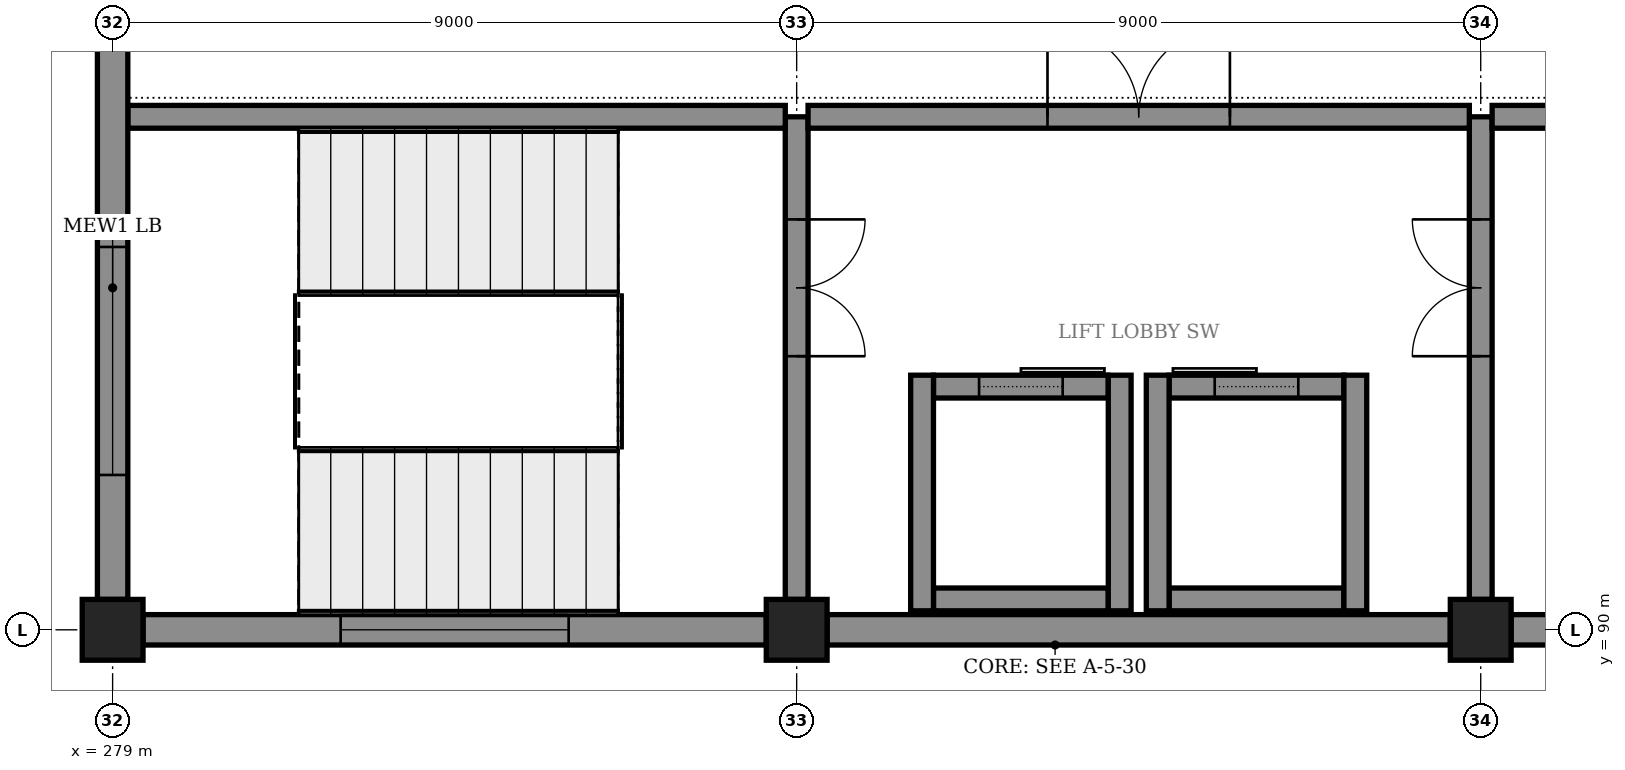
"""IFC4 building model, lengths in metres.
Left out: names, types, materials, properties, quantities, classifications, styles, units other than length and angle.
Written with IfcOpenShell. Run it as: python <this file> out.ifc"""

import sys

from ifc_helpers import new_model, si_unit, direction, frame, frame_2d, origin, origin_2d, place, context, subcontext, project, spatial, rectangle, extrude, element, fill, save


model = new_model("IFC4")
c1 = context("Model", 3, precision=1e-05, world=origin(), true_north=direction((0.0, 1.0)))
c2 = subcontext(c1, "Body", "Model", "MODEL_VIEW")
j1 = project(units=[si_unit("LENGTHUNIT", "METRE"), si_unit("PLANEANGLEUNIT", "RADIAN")], contexts=[c1])
p1 = place(None, origin())
s1 = spatial("IfcSite", under=j1, at=p1, CompositionType="ELEMENT")
p2 = place(p1, origin())
s2 = spatial("IfcBuilding", under=s1, at=p2, CompositionType="ELEMENT")
p3 = place(p2, frame((0.0, 0.0, 6.0)))
s3 = spatial("IfcBuildingStorey", under=s2, at=p3, CompositionType="ELEMENT", Elevation=6.0)
for number, where, z_axis, x_axis in (
    (1, (279.0, 90.0, 0.0), (0.0, 0.0, 1.0), (1.0, 0.0, 0.0)),
    (2, (288.0, 90.0, 0.0), (0.0, 0.0, 1.0), (1.0, 0.0, 0.0)),
    (3, (297.0, 90.0, 0.0), (0.0, 0.0, 1.0), (1.0, 0.0, 0.0)),
):
    element("IfcColumn", number, at=place(p3, frame(where, z_axis=z_axis, x_axis=x_axis)), inside=s3, PredefinedType="COLUMN", context=c2, shape_type="SweptSolid", body=[
        extrude(rectangle(XDim=0.8, YDim=0.8, at=origin_2d()), origin(), (0.0, 0.0, 1.0), 5.5),
    ])
p4 = place(p3, frame((279.4, 90.0, 0.0), z_axis=(0.0, 0.0, 1.0), x_axis=(1.0, 0.0, 0.0)))
e4 = element("IfcWall", 4, at=p4, inside=s3, PredefinedType="STANDARD", context=c2, shape_type="SweptSolid", body=[
    extrude(rectangle(XDim=8.2, YDim=0.4, at=frame_2d((4.1, 0.0))), origin(), (0.0, 0.0, 1.0), 4.32),
])
p5 = place(p4, frame((2.6, 0.0, 0.9)))
e5 = element("IfcOpeningElement", 5, at=p5, cuts=e4, PredefinedType="OPENING", context=c2, shape_type="SweptSolid", body=[
    extrude(rectangle(XDim=3.0, YDim=2.1, at=frame_2d((1.5, 1.05))), frame((0.0, 0.21, 0.0), z_axis=(0.0, -1.0, 0.0), x_axis=(1.0, 0.0, 0.0)), (0.0, 0.0, 1.0), 0.42),
])
p6 = place(p3, frame((288.4, 90.0, 0.0), z_axis=(0.0, 0.0, 1.0), x_axis=(1.0, 0.0, 0.0)))
e6 = element("IfcWall", 6, at=p6, inside=s3, PredefinedType="STANDARD", context=c2, shape_type="SweptSolid", body=[
    extrude(rectangle(XDim=8.2, YDim=0.4, at=frame_2d((4.1, 0.0))), origin(), (0.0, 0.0, 1.0), 4.32),
])
p7 = place(p3, frame((297.4, 90.0, 0.0), z_axis=(0.0, 0.0, 1.0), x_axis=(1.0, 0.0, 0.0)))
e7 = element("IfcWall", 7, at=p7, inside=s3, PredefinedType="STANDARD", context=c2, shape_type="SweptSolid", body=[
    extrude(rectangle(XDim=8.2, YDim=0.4, at=frame_2d((4.1, 0.0))), origin(), (0.0, 0.0, 1.0), 4.32),
])
p8 = place(p7, frame((2.6, 0.0, 0.9)))
e8 = element("IfcOpeningElement", 8, at=p8, cuts=e7, PredefinedType="OPENING", context=c2, shape_type="SweptSolid", body=[
    extrude(rectangle(XDim=3.0, YDim=2.1, at=frame_2d((1.5, 1.05))), frame((0.0, 0.21, 0.0), z_axis=(0.0, -1.0, 0.0), x_axis=(1.0, 0.0, 0.0)), (0.0, 0.0, 1.0), 0.42),
])
p9 = place(p3, frame((279.0, 90.4, 0.0), z_axis=(0.0, 0.0, 1.0), x_axis=(0.0, 1.0, 0.0)))
e9 = element("IfcWall", 9, at=p9, inside=s3, PredefinedType="STANDARD", context=c2, shape_type="SweptSolid", body=[
    extrude(rectangle(XDim=8.2, YDim=0.4, at=frame_2d((4.1, 0.0))), origin(), (0.0, 0.0, 1.0), 4.32),
])
p10 = place(p9, frame((1.638, 0.0, 0.9)))
e10 = element("IfcOpeningElement", 10, at=p10, cuts=e9, PredefinedType="OPENING", context=c2, shape_type="SweptSolid", body=[
    extrude(rectangle(XDim=3.0, YDim=2.1, at=frame_2d((1.5, 1.05))), frame((0.0, 0.21, 0.0), z_axis=(0.0, -1.0, 0.0), x_axis=(1.0, 0.0, 0.0)), (0.0, 0.0, 1.0), 0.42),
])
p11 = place(p3, frame((288.0, 90.4, 0.0), z_axis=(0.0, 0.0, 1.0), x_axis=(0.0, 1.0, 0.0)))
e11 = element("IfcWall", 11, at=p11, inside=s3, PredefinedType="SHEAR", context=c2, shape_type="SweptSolid", body=[
    extrude(rectangle(XDim=6.35, YDim=0.3, at=frame_2d((3.175, 0.0))), origin(), (0.0, 0.0, 1.0), 5.22),
])
p12 = place(p11, frame((3.2, 0.0, 0.0)))
e12 = element("IfcOpeningElement", 12, at=p12, cuts=e11, PredefinedType="OPENING", context=c2, shape_type="SweptSolid", body=[
    extrude(rectangle(XDim=1.8, YDim=2.4, at=frame_2d((0.9, 1.2))), frame((0.0, 0.16, 0.0), z_axis=(0.0, -1.0, 0.0), x_axis=(1.0, 0.0, 0.0)), (0.0, 0.0, 1.0), 0.32),
])
p13 = place(p3, frame((297.0, 90.4, 0.0), z_axis=(0.0, 0.0, 1.0), x_axis=(0.0, 1.0, 0.0)))
e13 = element("IfcWall", 13, at=p13, inside=s3, PredefinedType="SHEAR", context=c2, shape_type="SweptSolid", body=[
    extrude(rectangle(XDim=6.35, YDim=0.3, at=frame_2d((3.175, 0.0))), origin(), (0.0, 0.0, 1.0), 5.22),
])
p14 = place(p13, frame((3.2, 0.0, 0.0)))
e14 = element("IfcOpeningElement", 14, at=p14, cuts=e13, PredefinedType="OPENING", context=c2, shape_type="SweptSolid", body=[
    extrude(rectangle(XDim=1.8, YDim=2.4, at=frame_2d((0.9, 1.2))), frame((0.0, 0.16, 0.0), z_axis=(0.0, -1.0, 0.0), x_axis=(1.0, 0.0, 0.0)), (0.0, 0.0, 1.0), 0.32),
])
p15 = place(p3, frame((279.2, 96.75, 0.0), z_axis=(0.0, 0.0, 1.0), x_axis=(1.0, 0.0, 0.0)))
e15 = element("IfcWall", 15, at=p15, inside=s3, PredefinedType="SHEAR", context=c2, shape_type="SweptSolid", body=[
    extrude(rectangle(XDim=8.65, YDim=0.3, at=frame_2d((4.325, 0.0))), origin(), (0.0, 0.0, 1.0), 5.22),
])
p16 = place(p3, frame((288.15, 96.75, 0.0), z_axis=(0.0, 0.0, 1.0), x_axis=(1.0, 0.0, 0.0)))
e16 = element("IfcWall", 16, at=p16, inside=s3, PredefinedType="SHEAR", context=c2, shape_type="SweptSolid", body=[
    extrude(rectangle(XDim=8.7, YDim=0.3, at=frame_2d((4.35, 0.0))), origin(), (0.0, 0.0, 1.0), 5.22),
])
p17 = place(p16, frame((3.15, 0.0, 0.0)))
e17 = element("IfcOpeningElement", 17, at=p17, cuts=e16, PredefinedType="OPENING", context=c2, shape_type="SweptSolid", body=[
    extrude(rectangle(XDim=2.4, YDim=2.4, at=frame_2d((1.2, 1.2))), frame((0.0, 0.16, 0.0), z_axis=(0.0, -1.0, 0.0), x_axis=(1.0, 0.0, 0.0)), (0.0, 0.0, 1.0), 0.32),
])
p18 = place(p3, frame((297.15, 96.75, 0.0), z_axis=(0.0, 0.0, 1.0), x_axis=(1.0, 0.0, 0.0)))
e18 = element("IfcWall", 18, at=p18, inside=s3, PredefinedType="SHEAR", context=c2, shape_type="SweptSolid", body=[
    extrude(rectangle(XDim=8.7, YDim=0.3, at=frame_2d((4.35, 0.0))), origin(), (0.0, 0.0, 1.0), 5.22),
])
for number, where, z_axis, x_axis in (
    (19, (289.65, 90.25, 0.0), (0.0, 0.0, 1.0), (0.0, 1.0, 0.0)),
    (20, (292.25, 90.25, 0.0), (0.0, 0.0, 1.0), (0.0, 1.0, 0.0)),
):
    element("IfcWall", number, at=place(p3, frame(where, z_axis=z_axis, x_axis=x_axis)), inside=s3, PredefinedType="SHEAR", context=c2, shape_type="SweptSolid", body=[
        extrude(rectangle(XDim=3.1, YDim=0.3, at=frame_2d((1.55, 0.0))), origin(), (0.0, 0.0, 1.0), 5.5),
    ])
p19 = place(p3, frame((289.8, 90.4, 0.0), z_axis=(0.0, 0.0, 1.0), x_axis=(1.0, 0.0, 0.0)))
e21 = element("IfcWall", 21, at=p19, inside=s3, PredefinedType="SHEAR", context=c2, shape_type="SweptSolid", body=[
    extrude(rectangle(XDim=2.3, YDim=0.3, at=frame_2d((1.15, 0.0))), origin(), (0.0, 0.0, 1.0), 5.5),
])
p20 = place(p3, frame((289.8, 93.2, 0.0), z_axis=(0.0, 0.0, 1.0), x_axis=(1.0, 0.0, 0.0)))
e22 = element("IfcWall", 22, at=p20, inside=s3, PredefinedType="SHEAR", context=c2, shape_type="SweptSolid", body=[
    extrude(rectangle(XDim=2.3, YDim=0.3, at=frame_2d((1.15, 0.0))), origin(), (0.0, 0.0, 1.0), 5.5),
])
p21 = place(p20, frame((0.6, 0.0, 0.0)))
e23 = element("IfcOpeningElement", 23, at=p21, cuts=e22, PredefinedType="OPENING", context=c2, shape_type="SweptSolid", body=[
    extrude(rectangle(XDim=1.1, YDim=2.2, at=frame_2d((0.55, 1.1))), frame((0.0, 0.16, 0.0), z_axis=(0.0, -1.0, 0.0), x_axis=(1.0, 0.0, 0.0)), (0.0, 0.0, 1.0), 0.32),
])
for number, where, z_axis, x_axis in (
    (24, (292.75, 90.25, 0.0), (0.0, 0.0, 1.0), (0.0, 1.0, 0.0)),
    (25, (295.35, 90.25, 0.0), (0.0, 0.0, 1.0), (0.0, 1.0, 0.0)),
):
    element("IfcWall", number, at=place(p3, frame(where, z_axis=z_axis, x_axis=x_axis)), inside=s3, PredefinedType="SHEAR", context=c2, shape_type="SweptSolid", body=[
        extrude(rectangle(XDim=3.1, YDim=0.3, at=frame_2d((1.55, 0.0))), origin(), (0.0, 0.0, 1.0), 5.5),
    ])
p22 = place(p3, frame((292.9, 90.4, 0.0), z_axis=(0.0, 0.0, 1.0), x_axis=(1.0, 0.0, 0.0)))
e26 = element("IfcWall", 26, at=p22, inside=s3, PredefinedType="SHEAR", context=c2, shape_type="SweptSolid", body=[
    extrude(rectangle(XDim=2.3, YDim=0.3, at=frame_2d((1.15, 0.0))), origin(), (0.0, 0.0, 1.0), 5.5),
])
p23 = place(p3, frame((292.9, 93.2, 0.0), z_axis=(0.0, 0.0, 1.0), x_axis=(1.0, 0.0, 0.0)))
e27 = element("IfcWall", 27, at=p23, inside=s3, PredefinedType="SHEAR", context=c2, shape_type="SweptSolid", body=[
    extrude(rectangle(XDim=2.3, YDim=0.3, at=frame_2d((1.15, 0.0))), origin(), (0.0, 0.0, 1.0), 5.5),
])
p24 = place(p23, frame((0.6, 0.0, 0.0)))
e28 = element("IfcOpeningElement", 28, at=p24, cuts=e27, PredefinedType="OPENING", context=c2, shape_type="SweptSolid", body=[
    extrude(rectangle(XDim=1.1, YDim=2.2, at=frame_2d((0.55, 1.1))), frame((0.0, 0.16, 0.0), z_axis=(0.0, -1.0, 0.0), x_axis=(1.0, 0.0, 0.0)), (0.0, 0.0, 1.0), 0.32),
])
p25 = place(p5, origin())
e29 = element("IfcWindow", 29, at=p25, inside=s3, PartitioningType="TRIPLE_PANEL_VERTICAL", PredefinedType="WINDOW", context=c2, shape_type="SweptSolid", body=[
    extrude(rectangle(XDim=3.0, YDim=2.1, at=frame_2d((1.5, 1.05))), frame((0.0, 0.03, 0.0), z_axis=(0.0, -1.0, 0.0), x_axis=(1.0, 0.0, 0.0)), (0.0, 0.0, 1.0), 0.06),
])
fill(e5, e29)
p26 = place(p10, origin())
e30 = element("IfcWindow", 30, at=p26, inside=s3, PartitioningType="TRIPLE_PANEL_VERTICAL", PredefinedType="WINDOW", context=c2, shape_type="SweptSolid", body=[
    extrude(rectangle(XDim=3.0, YDim=2.1, at=frame_2d((1.5, 1.05))), frame((0.0, 0.03, 0.0), z_axis=(0.0, -1.0, 0.0), x_axis=(1.0, 0.0, 0.0)), (0.0, 0.0, 1.0), 0.06),
])
fill(e10, e30)
p27 = place(p12, frame((1.8, 0.0, 0.0), z_axis=(0.0, 0.0, 1.0), x_axis=(-1.0, 0.0, 0.0)))
e31 = element("IfcDoor", 31, at=p27, inside=s3, OperationType="DOUBLE_DOOR_SINGLE_SWING", PredefinedType="DOOR", context=c2, shape_type="SweptSolid", body=[
    extrude(rectangle(XDim=1.8, YDim=2.4, at=frame_2d((0.9, 1.2))), frame((0.0, 0.025, 0.0), z_axis=(0.0, -1.0, 0.0), x_axis=(1.0, 0.0, 0.0)), (0.0, 0.0, 1.0), 0.05),
])
fill(e12, e31)
p28 = place(p14, origin())
e32 = element("IfcDoor", 32, at=p28, inside=s3, OperationType="DOUBLE_DOOR_SINGLE_SWING", PredefinedType="DOOR", context=c2, shape_type="SweptSolid", body=[
    extrude(rectangle(XDim=1.8, YDim=2.4, at=frame_2d((0.9, 1.2))), frame((0.0, 0.025, 0.0), z_axis=(0.0, -1.0, 0.0), x_axis=(1.0, 0.0, 0.0)), (0.0, 0.0, 1.0), 0.05),
])
fill(e14, e32)
p29 = place(p17, origin())
e33 = element("IfcDoor", 33, at=p29, inside=s3, OperationType="DOUBLE_DOOR_SINGLE_SWING", PredefinedType="DOOR", context=c2, shape_type="SweptSolid", body=[
    extrude(rectangle(XDim=2.4, YDim=2.4, at=frame_2d((1.2, 1.2))), frame((0.0, 0.025, 0.0), z_axis=(0.0, -1.0, 0.0), x_axis=(1.0, 0.0, 0.0)), (0.0, 0.0, 1.0), 0.05),
])
fill(e17, e33)
p30 = place(p21, origin())
e34 = element("IfcDoor", 34, at=p30, inside=s3, OperationType="SLIDING_TO_RIGHT", PredefinedType="DOOR", context=c2, shape_type="SweptSolid", body=[
    extrude(rectangle(XDim=1.1, YDim=2.2, at=frame_2d((0.55, 1.1))), frame((0.0, 0.025, 0.0), z_axis=(0.0, -1.0, 0.0), x_axis=(1.0, 0.0, 0.0)), (0.0, 0.0, 1.0), 0.05),
])
fill(e23, e34)
p31 = place(p24, origin())
e35 = element("IfcDoor", 35, at=p31, inside=s3, OperationType="SLIDING_TO_LEFT", PredefinedType="DOOR", context=c2, shape_type="SweptSolid", body=[
    extrude(rectangle(XDim=1.1, YDim=2.2, at=frame_2d((0.55, 1.1))), frame((0.0, 0.025, 0.0), z_axis=(0.0, -1.0, 0.0), x_axis=(1.0, 0.0, 0.0)), (0.0, 0.0, 1.0), 0.05),
])
fill(e28, e35)
save(model, sys.argv[1])
